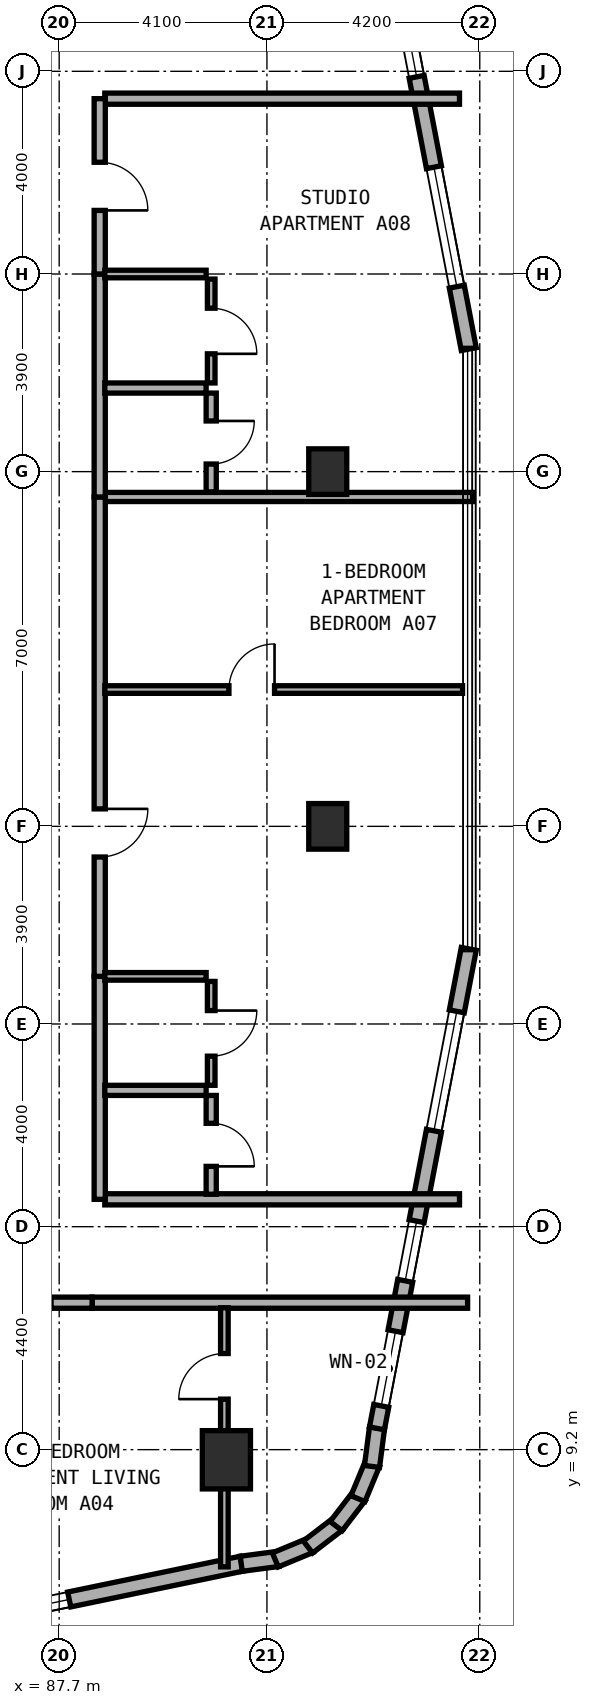
"""IFC4 building model, lengths in metres.
Left out: names, types, materials, properties, quantities, classifications, styles, units other than length and angle.
Written with IfcOpenShell. Run it as: python <this file> out.ifc"""

import sys

from ifc_helpers import new_model, si_unit, direction, frame, frame_2d, origin, origin_2d, place, context, subcontext, project, spatial, rectangle, extrude, element, fill, save


model = new_model("IFC4")
c1 = context("Model", 3, precision=1e-05, world=origin(), true_north=direction((0.0, 1.0)))
c2 = subcontext(c1, "Body", "Model", "MODEL_VIEW")
j1 = project(units=[si_unit("LENGTHUNIT", "METRE"), si_unit("PLANEANGLEUNIT", "RADIAN")], contexts=[c1])
p1 = place(None, origin())
s1 = spatial("IfcSite", under=j1, at=p1, CompositionType="ELEMENT")
p2 = place(p1, origin())
s2 = spatial("IfcBuilding", under=s1, at=p2, CompositionType="ELEMENT")
p3 = place(p2, frame((0.0, 0.0, 62.5)))
s3 = spatial("IfcBuildingStorey", under=s2, at=p3, CompositionType="ELEMENT", Elevation=62.5)
for number, where, z_axis, x_axis in (
    (1, (93.0, 21.5, 0.0), (0.0, 0.0, 1.0), (1.0, 0.0, 0.0)),
    (2, (93.0, 28.5, 0.0), (0.0, 0.0, 1.0), (1.0, 0.0, 0.0)),
):
    element("IfcColumn", number, at=place(p3, frame(where, z_axis=z_axis, x_axis=x_axis)), inside=s3, PredefinedType="COLUMN", context=c2, shape_type="SweptSolid", body=[
        extrude(rectangle(XDim=0.75, YDim=0.9, at=origin_2d()), origin(), (0.0, 0.0, 1.0), 3.5),
    ])
p4 = place(p3, frame((91.0, 9.0, 0.0), z_axis=(0.0, 0.0, 1.0), x_axis=(1.0, 0.0, 0.0)))
e3 = element("IfcColumn", 3, at=p4, inside=s3, PredefinedType="COLUMN", context=c2, shape_type="SweptSolid", body=[
    extrude(rectangle(XDim=0.95, YDim=1.15, at=origin_2d()), origin(), (0.0, 0.0, 1.0), 3.5),
])
p5 = place(p3, frame((82.564, 5.136, 0.0), z_axis=(0.0, 0.0, 1.0), x_axis=(0.979128391325, 0.203242695569, 0.0)))
e4 = element("IfcWall", 4, at=p5, inside=s3, PredefinedType="STANDARD", context=c2, shape_type="SweptSolid", body=[
    extrude(rectangle(XDim=8.92, YDim=0.3, at=frame_2d((4.46, 0.0))), origin(), (0.0, 0.0, 1.0), 3.25),
])
p6 = place(p5, frame((3.048, 0.0, 0.8)))
e5 = element("IfcOpeningElement", 5, at=p6, cuts=e4, PredefinedType="OPENING", context=c2, shape_type="SweptSolid", body=[
    extrude(rectangle(XDim=2.4, YDim=1.6, at=frame_2d((1.2, 0.8))), frame((0.0, 0.16, 0.0), z_axis=(0.0, -1.0, 0.0), x_axis=(1.0, 0.0, 0.0)), (0.0, 0.0, 1.0), 0.32),
])
p7 = place(p3, frame((91.293, 6.948, 0.0), z_axis=(0.0, 0.0, 1.0), x_axis=(0.991486167159, 0.13021205909, 0.0)))
e6 = element("IfcWall", 6, at=p7, inside=s3, PredefinedType="STANDARD", context=c2, shape_type="SweptSolid", body=[
    extrude(rectangle(XDim=0.729, YDim=0.3, at=frame_2d((0.365, 0.0))), origin(), (0.0, 0.0, 1.0), 3.25),
])
for number, where, z_axis, x_axis in (
    (7, (91.965, 7.024, 0.0), (0.0, 0.0, 1.0), (0.924, 0.384, 0.0)),
    (8, (92.609, 7.279, 0.0), (0.0, 0.0, 1.0), (0.794, 0.608, 0.0)),
    (9, (93.166, 7.691, 0.0), (0.0, 0.0, 1.0), (0.609, 0.793, 0.0)),
):
    element("IfcWall", number, at=place(p3, frame(where, z_axis=z_axis, x_axis=x_axis)), inside=s3, PredefinedType="STANDARD", context=c2, shape_type="SweptSolid", body=[
        extrude(rectangle(XDim=0.746, YDim=0.3, at=frame_2d((0.373, 0.0))), origin(), (0.0, 0.0, 1.0), 3.25),
    ])
p8 = place(p3, frame((93.596, 8.234, 0.0), z_axis=(0.0, 0.0, 1.0), x_axis=(0.383430326427, 0.923569805037, 0.0)))
e10 = element("IfcWall", 10, at=p8, inside=s3, PredefinedType="STANDARD", context=c2, shape_type="SweptSolid", body=[
    extrude(rectangle(XDim=0.746, YDim=0.3, at=frame_2d((0.373, 0.0))), origin(), (0.0, 0.0, 1.0), 3.25),
])
p9 = place(p3, frame((93.873, 8.869, 0.0), z_axis=(0.0, 0.0, 1.0), x_axis=(0.129339184068, 0.991600411186, 0.0)))
e11 = element("IfcWall", 11, at=p9, inside=s3, PredefinedType="STANDARD", context=c2, shape_type="SweptSolid", body=[
    extrude(rectangle(XDim=0.764, YDim=0.3, at=frame_2d((0.382, 0.0))), origin(), (0.0, 0.0, 1.0), 3.25),
])
p10 = place(p3, frame((93.971, 9.62, 0.0), z_axis=(0.0, 0.0, 1.0), x_axis=(0.188087874316, 0.982152203854, 0.0)))
e12 = element("IfcWall", 12, at=p10, inside=s3, PredefinedType="STANDARD", context=c2, shape_type="SweptSolid", body=[
    extrude(rectangle(XDim=9.634, YDim=0.3, at=frame_2d((4.817, 0.0))), origin(), (0.0, 0.0, 1.0), 3.25),
])
p11 = place(p10, frame((0.452, 0.0, 0.85)))
e13 = element("IfcOpeningElement", 13, at=p11, cuts=e12, PredefinedType="OPENING", context=c2, shape_type="SweptSolid", body=[
    extrude(rectangle(XDim=1.5, YDim=1.5, at=frame_2d((0.75, 0.75))), frame((0.0, 0.16, 0.0), z_axis=(0.0, -1.0, 0.0), x_axis=(1.0, 0.0, 0.0)), (0.0, 0.0, 1.0), 0.32),
])
p12 = place(p10, frame((2.964, 0.0, 0.85)))
e14 = element("IfcOpeningElement", 14, at=p12, cuts=e12, PredefinedType="OPENING", context=c2, shape_type="SweptSolid", body=[
    extrude(rectangle(XDim=1.2, YDim=1.5, at=frame_2d((0.6, 0.75))), frame((0.0, 0.16, 0.0), z_axis=(0.0, -1.0, 0.0), x_axis=(1.0, 0.0, 0.0)), (0.0, 0.0, 1.0), 0.32),
])
p13 = place(p10, frame((5.979, 0.0, 0.8)))
e15 = element("IfcOpeningElement", 15, at=p13, cuts=e12, PredefinedType="OPENING", context=c2, shape_type="SweptSolid", body=[
    extrude(rectangle(XDim=2.4, YDim=1.6, at=frame_2d((1.2, 0.8))), frame((0.0, 0.16, 0.0), z_axis=(0.0, -1.0, 0.0), x_axis=(1.0, 0.0, 0.0)), (0.0, 0.0, 1.0), 0.32),
])
p14 = place(p3, frame((95.783, 30.918, 0.0), z_axis=(0.0, 0.0, 1.0), x_axis=(-0.188087874316, 0.982152203854, 0.0)))
e16 = element("IfcWall", 16, at=p14, inside=s3, PredefinedType="STANDARD", context=c2, shape_type="SweptSolid", body=[
    extrude(rectangle(XDim=9.634, YDim=0.3, at=frame_2d((4.817, 0.0))), origin(), (0.0, 0.0, 1.0), 3.25),
])
p15 = place(p14, frame((1.255, 0.0, 0.8)))
e17 = element("IfcOpeningElement", 17, at=p15, cuts=e16, PredefinedType="OPENING", context=c2, shape_type="SweptSolid", body=[
    extrude(rectangle(XDim=2.4, YDim=1.6, at=frame_2d((1.2, 0.8))), frame((0.0, 0.16, 0.0), z_axis=(0.0, -1.0, 0.0), x_axis=(1.0, 0.0, 0.0)), (0.0, 0.0, 1.0), 0.32),
])
p16 = place(p14, frame((5.47, 0.0, 0.85)))
e18 = element("IfcOpeningElement", 18, at=p16, cuts=e16, PredefinedType="OPENING", context=c2, shape_type="SweptSolid", body=[
    extrude(rectangle(XDim=1.2, YDim=1.5, at=frame_2d((0.6, 0.75))), frame((0.0, 0.16, 0.0), z_axis=(0.0, -1.0, 0.0), x_axis=(1.0, 0.0, 0.0)), (0.0, 0.0, 1.0), 0.32),
])
p17 = place(p14, frame((7.682, 0.0, 0.85)))
e19 = element("IfcOpeningElement", 19, at=p17, cuts=e16, PredefinedType="OPENING", context=c2, shape_type="SweptSolid", body=[
    extrude(rectangle(XDim=1.5, YDim=1.5, at=frame_2d((0.75, 0.75))), frame((0.0, 0.16, 0.0), z_axis=(0.0, -1.0, 0.0), x_axis=(1.0, 0.0, 0.0)), (0.0, 0.0, 1.0), 0.32),
])
p18 = place(p3, frame((88.35, 12.1, 0.0), z_axis=(0.0, 0.0, 1.0), x_axis=(1.0, 0.0, 0.0)))
e20 = element("IfcWall", 20, at=p18, inside=s3, PredefinedType="SOLIDWALL", context=c2, shape_type="SweptSolid", body=[
    extrude(rectangle(XDim=7.41, YDim=0.22, at=frame_2d((3.705, 0.0))), origin(), (0.0, 0.0, 1.0), 2.865),
])
p19 = place(p3, frame((85.78, 12.1, 0.0), z_axis=(0.0, 0.0, 1.0), x_axis=(1.0, 0.0, 0.0)))
e21 = element("IfcWall", 21, at=p19, inside=s3, PredefinedType="SOLIDWALL", context=c2, shape_type="SweptSolid", body=[
    extrude(rectangle(XDim=2.57, YDim=0.22, at=frame_2d((1.285, 0.0))), origin(), (0.0, 0.0, 1.0), 3.22),
])
p20 = place(p19, frame((0.81, 0.0, 0.0)))
e22 = element("IfcOpeningElement", 22, at=p20, cuts=e21, PredefinedType="OPENING", context=c2, shape_type="SweptSolid", body=[
    extrude(rectangle(XDim=0.95, YDim=2.1, at=frame_2d((0.475, 1.05))), frame((0.0, 0.12, 0.0), z_axis=(0.0, -1.0, 0.0), x_axis=(1.0, 0.0, 0.0)), (0.0, 0.0, 1.0), 0.24),
])
p21 = place(p3, frame((90.96, 6.887, 0.0), z_axis=(0.0, 0.0, 1.0), x_axis=(0.0, 1.0, 0.0)))
e23 = element("IfcWall", 23, at=p21, inside=s3, PredefinedType="PARTITIONING", context=c2, shape_type="SweptSolid", body=[
    extrude(rectangle(XDim=5.113, YDim=0.15, at=frame_2d((2.557, 0.0))), origin(), (0.0, 0.0, 1.0), 2.865),
])
p22 = place(p21, frame((3.31, 0.0, 0.0)))
e24 = element("IfcOpeningElement", 24, at=p22, cuts=e23, PredefinedType="OPENING", context=c2, shape_type="SweptSolid", body=[
    extrude(rectangle(XDim=0.9, YDim=2.1, at=frame_2d((0.45, 1.05))), frame((0.0, 0.085, 0.0), z_axis=(0.0, -1.0, 0.0), x_axis=(1.0, 0.0, 0.0)), (0.0, 0.0, 1.0), 0.17),
])
for number, where, z_axis, x_axis in (
    (25, (88.6, 14.14, 0.0), (0.0, 0.0, 1.0), (1.0, 0.0, 0.0)),
    (26, (88.6, 35.86, 0.0), (0.0, 0.0, 1.0), (1.0, 0.0, 0.0)),
):
    element("IfcWall", number, at=place(p3, frame(where, z_axis=z_axis, x_axis=x_axis)), inside=s3, PredefinedType="SOLIDWALL", context=c2, shape_type="SweptSolid", body=[
        extrude(rectangle(XDim=7.0, YDim=0.22, at=frame_2d((3.5, 0.0))), origin(), (0.0, 0.0, 1.0), 2.865),
    ])
p23 = place(p3, frame((88.5, 28.0, 0.0), z_axis=(0.0, 0.0, 1.0), x_axis=(1.0, 0.0, 0.0)))
e27 = element("IfcWall", 27, at=p23, inside=s3, PredefinedType="SOLIDWALL", context=c2, shape_type="SweptSolid", body=[
    extrude(rectangle(XDim=7.36, YDim=0.18, at=frame_2d((3.68, 0.0))), origin(), (0.0, 0.0, 1.0), 2.865),
])
p24 = place(p3, frame((88.5, 14.14, 0.0), z_axis=(0.0, 0.0, 1.0), x_axis=(0.0, 1.0, 0.0)))
e28 = element("IfcWall", 28, at=p24, inside=s3, PredefinedType="SOLIDWALL", context=c2, shape_type="SweptSolid", body=[
    extrude(rectangle(XDim=4.4, YDim=0.22, at=frame_2d((2.2, 0.0))), origin(), (0.0, 0.0, 1.0), 3.22),
])
p25 = place(p3, frame((88.5, 18.54, 0.0), z_axis=(0.0, 0.0, 1.0), x_axis=(0.0, 1.0, 0.0)))
e29 = element("IfcWall", 29, at=p25, inside=s3, PredefinedType="SOLIDWALL", context=c2, shape_type="SweptSolid", body=[
    extrude(rectangle(XDim=9.46, YDim=0.22, at=frame_2d((4.73, 0.0))), origin(), (0.0, 0.0, 1.0), 2.725),
])
p26 = place(p25, frame((2.355, 0.0, 0.0)))
e30 = element("IfcOpeningElement", 30, at=p26, cuts=e29, PredefinedType="OPENING", context=c2, shape_type="SweptSolid", body=[
    extrude(rectangle(XDim=0.95, YDim=2.1, at=frame_2d((0.475, 1.05))), frame((0.0, 0.12, 0.0), z_axis=(0.0, -1.0, 0.0), x_axis=(1.0, 0.0, 0.0)), (0.0, 0.0, 1.0), 0.24),
])
p27 = place(p3, frame((88.6, 24.2, 0.0), z_axis=(0.0, 0.0, 1.0), x_axis=(1.0, 0.0, 0.0)))
e31 = element("IfcWall", 31, at=p27, inside=s3, PredefinedType="PARTITIONING", context=c2, shape_type="SweptSolid", body=[
    extrude(rectangle(XDim=7.06, YDim=0.15, at=frame_2d((3.53, 0.0))), origin(), (0.0, 0.0, 1.0), 2.865),
])
p28 = place(p27, frame((2.45, 0.0, 0.0)))
e32 = element("IfcOpeningElement", 32, at=p28, cuts=e31, PredefinedType="OPENING", context=c2, shape_type="SweptSolid", body=[
    extrude(rectangle(XDim=0.9, YDim=2.1, at=frame_2d((0.45, 1.05))), frame((0.0, 0.085, 0.0), z_axis=(0.0, -1.0, 0.0), x_axis=(1.0, 0.0, 0.0)), (0.0, 0.0, 1.0), 0.17),
])
p29 = place(p3, frame((88.6, 16.29, 0.0), z_axis=(0.0, 0.0, 1.0), x_axis=(1.0, 0.0, 0.0)))
e33 = element("IfcWall", 33, at=p29, inside=s3, PredefinedType="PLUMBINGWALL", context=c2, shape_type="SweptSolid", body=[
    extrude(rectangle(XDim=2.0, YDim=0.2, at=frame_2d((1.0, 0.0))), origin(), (0.0, 0.0, 1.0), 3.22),
])
p30 = place(p3, frame((88.6, 18.54, 0.0), z_axis=(0.0, 0.0, 1.0), x_axis=(1.0, 0.0, 0.0)))
e34 = element("IfcWall", 34, at=p30, inside=s3, PredefinedType="PARTITIONING", context=c2, shape_type="SweptSolid", body=[
    extrude(rectangle(XDim=2.0, YDim=0.15, at=frame_2d((1.0, 0.0))), origin(), (0.0, 0.0, 1.0), 3.22),
])
p31 = place(p3, frame((90.7, 14.24, 0.0), z_axis=(0.0, 0.0, 1.0), x_axis=(0.0, 1.0, 0.0)))
e35 = element("IfcWall", 35, at=p31, inside=s3, PredefinedType="PLUMBINGWALL", context=c2, shape_type="SweptSolid", body=[
    extrude(rectangle(XDim=1.95, YDim=0.2, at=frame_2d((0.975, 0.0))), origin(), (0.0, 0.0, 1.0), 3.22),
])
p32 = place(p31, frame((0.55, 0.0, 0.0)))
e36 = element("IfcOpeningElement", 36, at=p32, cuts=e35, PredefinedType="OPENING", context=c2, shape_type="SweptSolid", body=[
    extrude(rectangle(XDim=0.85, YDim=2.1, at=frame_2d((0.425, 1.05))), frame((0.0, 0.11, 0.0), z_axis=(0.0, -1.0, 0.0), x_axis=(1.0, 0.0, 0.0)), (0.0, 0.0, 1.0), 0.22),
])
p33 = place(p3, frame((90.7, 16.39, 0.0), z_axis=(0.0, 0.0, 1.0), x_axis=(0.0, 1.0, 0.0)))
e37 = element("IfcWall", 37, at=p33, inside=s3, PredefinedType="PARTITIONING", context=c2, shape_type="SweptSolid", body=[
    extrude(rectangle(XDim=2.05, YDim=0.15, at=frame_2d((1.025, 0.0))), origin(), (0.0, 0.0, 1.0), 3.22),
])
p34 = place(p33, frame((0.575, 0.0, 0.0)))
e38 = element("IfcOpeningElement", 38, at=p34, cuts=e37, PredefinedType="OPENING", context=c2, shape_type="SweptSolid", body=[
    extrude(rectangle(XDim=0.9, YDim=2.1, at=frame_2d((0.45, 1.05))), frame((0.0, 0.085, 0.0), z_axis=(0.0, -1.0, 0.0), x_axis=(1.0, 0.0, 0.0)), (0.0, 0.0, 1.0), 0.17),
])
p35 = place(p3, frame((88.5, 28.0, 0.0), z_axis=(0.0, 0.0, 1.0), x_axis=(0.0, 1.0, 0.0)))
e39 = element("IfcWall", 39, at=p35, inside=s3, PredefinedType="SOLIDWALL", context=c2, shape_type="SweptSolid", body=[
    extrude(rectangle(XDim=4.4, YDim=0.22, at=frame_2d((2.2, 0.0))), origin(), (0.0, 0.0, 1.0), 2.725),
])
p36 = place(p3, frame((88.5, 32.4, 0.0), z_axis=(0.0, 0.0, 1.0), x_axis=(0.0, 1.0, 0.0)))
e40 = element("IfcWall", 40, at=p36, inside=s3, PredefinedType="SOLIDWALL", context=c2, shape_type="SweptSolid", body=[
    extrude(rectangle(XDim=3.46, YDim=0.22, at=frame_2d((1.73, 0.0))), origin(), (0.0, 0.0, 1.0), 3.22),
])
p37 = place(p36, frame((1.255, 0.0, 0.0)))
e41 = element("IfcOpeningElement", 41, at=p37, cuts=e40, PredefinedType="OPENING", context=c2, shape_type="SweptSolid", body=[
    extrude(rectangle(XDim=0.95, YDim=2.1, at=frame_2d((0.475, 1.05))), frame((0.0, 0.12, 0.0), z_axis=(0.0, -1.0, 0.0), x_axis=(1.0, 0.0, 0.0)), (0.0, 0.0, 1.0), 0.24),
])
p38 = place(p3, frame((88.6, 30.15, 0.0), z_axis=(0.0, 0.0, 1.0), x_axis=(1.0, 0.0, 0.0)))
e42 = element("IfcWall", 42, at=p38, inside=s3, PredefinedType="PLUMBINGWALL", context=c2, shape_type="SweptSolid", body=[
    extrude(rectangle(XDim=2.0, YDim=0.2, at=frame_2d((1.0, 0.0))), origin(), (0.0, 0.0, 1.0), 3.22),
])
p39 = place(p3, frame((88.6, 32.4, 0.0), z_axis=(0.0, 0.0, 1.0), x_axis=(1.0, 0.0, 0.0)))
e43 = element("IfcWall", 43, at=p39, inside=s3, PredefinedType="PARTITIONING", context=c2, shape_type="SweptSolid", body=[
    extrude(rectangle(XDim=2.0, YDim=0.15, at=frame_2d((1.0, 0.0))), origin(), (0.0, 0.0, 1.0), 3.22),
])
p40 = place(p3, frame((90.7, 28.1, 0.0), z_axis=(0.0, 0.0, 1.0), x_axis=(0.0, 1.0, 0.0)))
e44 = element("IfcWall", 44, at=p40, inside=s3, PredefinedType="PLUMBINGWALL", context=c2, shape_type="SweptSolid", body=[
    extrude(rectangle(XDim=1.95, YDim=0.2, at=frame_2d((0.975, 0.0))), origin(), (0.0, 0.0, 1.0), 2.725),
])
p41 = place(p40, frame((0.55, 0.0, 0.0)))
e45 = element("IfcOpeningElement", 45, at=p41, cuts=e44, PredefinedType="OPENING", context=c2, shape_type="SweptSolid", body=[
    extrude(rectangle(XDim=0.85, YDim=2.1, at=frame_2d((0.425, 1.05))), frame((0.0, 0.11, 0.0), z_axis=(0.0, -1.0, 0.0), x_axis=(1.0, 0.0, 0.0)), (0.0, 0.0, 1.0), 0.22),
])
p42 = place(p3, frame((90.7, 30.25, 0.0), z_axis=(0.0, 0.0, 1.0), x_axis=(0.0, 1.0, 0.0)))
e46 = element("IfcWall", 46, at=p42, inside=s3, PredefinedType="PARTITIONING", context=c2, shape_type="SweptSolid", body=[
    extrude(rectangle(XDim=2.05, YDim=0.15, at=frame_2d((1.025, 0.0))), origin(), (0.0, 0.0, 1.0), 3.22),
])
p43 = place(p42, frame((0.575, 0.0, 0.0)))
e47 = element("IfcOpeningElement", 47, at=p43, cuts=e46, PredefinedType="OPENING", context=c2, shape_type="SweptSolid", body=[
    extrude(rectangle(XDim=0.9, YDim=2.1, at=frame_2d((0.45, 1.05))), frame((0.0, 0.085, 0.0), z_axis=(0.0, -1.0, 0.0), x_axis=(1.0, 0.0, 0.0)), (0.0, 0.0, 1.0), 0.17),
])
p44 = place(p6, origin())
e48 = element("IfcWindow", 48, at=p44, inside=s3, PartitioningType="SINGLE_PANEL", PredefinedType="WINDOW", context=c2, shape_type="SweptSolid", body=[
    extrude(rectangle(XDim=2.4, YDim=1.6, at=frame_2d((1.2, 0.8))), frame((0.0, 0.03, 0.0), z_axis=(0.0, -1.0, 0.0), x_axis=(1.0, 0.0, 0.0)), (0.0, 0.0, 1.0), 0.06),
])
fill(e5, e48)
p45 = place(p11, origin())
e49 = element("IfcWindow", 49, at=p45, inside=s3, PartitioningType="SINGLE_PANEL", PredefinedType="WINDOW", context=c2, shape_type="SweptSolid", body=[
    extrude(rectangle(XDim=1.5, YDim=1.5, at=frame_2d((0.75, 0.75))), frame((0.0, 0.03, 0.0), z_axis=(0.0, -1.0, 0.0), x_axis=(1.0, 0.0, 0.0)), (0.0, 0.0, 1.0), 0.06),
])
fill(e13, e49)
p46 = place(p12, origin())
e50 = element("IfcWindow", 50, at=p46, inside=s3, PartitioningType="SINGLE_PANEL", PredefinedType="WINDOW", context=c2, shape_type="SweptSolid", body=[
    extrude(rectangle(XDim=1.2, YDim=1.5, at=frame_2d((0.6, 0.75))), frame((0.0, 0.03, 0.0), z_axis=(0.0, -1.0, 0.0), x_axis=(1.0, 0.0, 0.0)), (0.0, 0.0, 1.0), 0.06),
])
fill(e14, e50)
p47 = place(p13, origin())
e51 = element("IfcWindow", 51, at=p47, inside=s3, PartitioningType="SINGLE_PANEL", PredefinedType="WINDOW", context=c2, shape_type="SweptSolid", body=[
    extrude(rectangle(XDim=2.4, YDim=1.6, at=frame_2d((1.2, 0.8))), frame((0.0, 0.03, 0.0), z_axis=(0.0, -1.0, 0.0), x_axis=(1.0, 0.0, 0.0)), (0.0, 0.0, 1.0), 0.06),
])
fill(e15, e51)
p48 = place(p15, origin())
e52 = element("IfcWindow", 52, at=p48, inside=s3, PartitioningType="SINGLE_PANEL", PredefinedType="WINDOW", context=c2, shape_type="SweptSolid", body=[
    extrude(rectangle(XDim=2.4, YDim=1.6, at=frame_2d((1.2, 0.8))), frame((0.0, 0.03, 0.0), z_axis=(0.0, -1.0, 0.0), x_axis=(1.0, 0.0, 0.0)), (0.0, 0.0, 1.0), 0.06),
])
fill(e17, e52)
p49 = place(p16, origin())
e53 = element("IfcWindow", 53, at=p49, inside=s3, PartitioningType="SINGLE_PANEL", PredefinedType="WINDOW", context=c2, shape_type="SweptSolid", body=[
    extrude(rectangle(XDim=1.2, YDim=1.5, at=frame_2d((0.6, 0.75))), frame((0.0, 0.03, 0.0), z_axis=(0.0, -1.0, 0.0), x_axis=(1.0, 0.0, 0.0)), (0.0, 0.0, 1.0), 0.06),
])
fill(e18, e53)
p50 = place(p22, origin())
e54 = element("IfcDoor", 54, at=p50, inside=s3, OperationType="SINGLE_SWING_LEFT", PredefinedType="DOOR", context=c2, shape_type="SweptSolid", body=[
    extrude(rectangle(XDim=0.9, YDim=2.1, at=frame_2d((0.45, 1.05))), frame((0.0, 0.025, 0.0), z_axis=(0.0, -1.0, 0.0), x_axis=(1.0, 0.0, 0.0)), (0.0, 0.0, 1.0), 0.05),
])
fill(e24, e54)
p51 = place(p26, frame((0.95, 0.0, 0.0), z_axis=(0.0, 0.0, 1.0), x_axis=(-1.0, 0.0, 0.0)))
e55 = element("IfcDoor", 55, at=p51, inside=s3, OperationType="SINGLE_SWING_LEFT", PredefinedType="DOOR", context=c2, shape_type="SweptSolid", body=[
    extrude(rectangle(XDim=0.95, YDim=2.1, at=frame_2d((0.475, 1.05))), frame((0.0, 0.025, 0.0), z_axis=(0.0, -1.0, 0.0), x_axis=(1.0, 0.0, 0.0)), (0.0, 0.0, 1.0), 0.05),
])
fill(e30, e55)
p52 = place(p28, origin())
e56 = element("IfcDoor", 56, at=p52, inside=s3, OperationType="SINGLE_SWING_RIGHT", PredefinedType="DOOR", context=c2, shape_type="SweptSolid", body=[
    extrude(rectangle(XDim=0.9, YDim=2.1, at=frame_2d((0.45, 1.05))), frame((0.0, 0.025, 0.0), z_axis=(0.0, -1.0, 0.0), x_axis=(1.0, 0.0, 0.0)), (0.0, 0.0, 1.0), 0.05),
])
fill(e32, e56)
p53 = place(p32, frame((0.85, 0.0, 0.0), z_axis=(0.0, 0.0, 1.0), x_axis=(-1.0, 0.0, 0.0)))
e57 = element("IfcDoor", 57, at=p53, inside=s3, OperationType="SINGLE_SWING_RIGHT", PredefinedType="DOOR", context=c2, shape_type="SweptSolid", body=[
    extrude(rectangle(XDim=0.85, YDim=2.1, at=frame_2d((0.425, 1.05))), frame((0.0, 0.025, 0.0), z_axis=(0.0, -1.0, 0.0), x_axis=(1.0, 0.0, 0.0)), (0.0, 0.0, 1.0), 0.05),
])
fill(e36, e57)
p54 = place(p34, frame((0.9, 0.0, 0.0), z_axis=(0.0, 0.0, 1.0), x_axis=(-1.0, 0.0, 0.0)))
e58 = element("IfcDoor", 58, at=p54, inside=s3, OperationType="SINGLE_SWING_LEFT", PredefinedType="DOOR", context=c2, shape_type="SweptSolid", body=[
    extrude(rectangle(XDim=0.9, YDim=2.1, at=frame_2d((0.45, 1.05))), frame((0.0, 0.025, 0.0), z_axis=(0.0, -1.0, 0.0), x_axis=(1.0, 0.0, 0.0)), (0.0, 0.0, 1.0), 0.05),
])
fill(e38, e58)
p55 = place(p37, frame((0.95, 0.0, 0.0), z_axis=(0.0, 0.0, 1.0), x_axis=(-1.0, 0.0, 0.0)))
e59 = element("IfcDoor", 59, at=p55, inside=s3, OperationType="SINGLE_SWING_RIGHT", PredefinedType="DOOR", context=c2, shape_type="SweptSolid", body=[
    extrude(rectangle(XDim=0.95, YDim=2.1, at=frame_2d((0.475, 1.05))), frame((0.0, 0.025, 0.0), z_axis=(0.0, -1.0, 0.0), x_axis=(1.0, 0.0, 0.0)), (0.0, 0.0, 1.0), 0.05),
])
fill(e41, e59)
p56 = place(p41, frame((0.85, 0.0, 0.0), z_axis=(0.0, 0.0, 1.0), x_axis=(-1.0, 0.0, 0.0)))
e60 = element("IfcDoor", 60, at=p56, inside=s3, OperationType="SINGLE_SWING_LEFT", PredefinedType="DOOR", context=c2, shape_type="SweptSolid", body=[
    extrude(rectangle(XDim=0.85, YDim=2.1, at=frame_2d((0.425, 1.05))), frame((0.0, 0.025, 0.0), z_axis=(0.0, -1.0, 0.0), x_axis=(1.0, 0.0, 0.0)), (0.0, 0.0, 1.0), 0.05),
])
fill(e45, e60)
p57 = place(p43, frame((0.9, 0.0, 0.0), z_axis=(0.0, 0.0, 1.0), x_axis=(-1.0, 0.0, 0.0)))
e61 = element("IfcDoor", 61, at=p57, inside=s3, OperationType="SINGLE_SWING_RIGHT", PredefinedType="DOOR", context=c2, shape_type="SweptSolid", body=[
    extrude(rectangle(XDim=0.9, YDim=2.1, at=frame_2d((0.45, 1.05))), frame((0.0, 0.025, 0.0), z_axis=(0.0, -1.0, 0.0), x_axis=(1.0, 0.0, 0.0)), (0.0, 0.0, 1.0), 0.05),
])
fill(e47, e61)
save(model, sys.argv[1])
